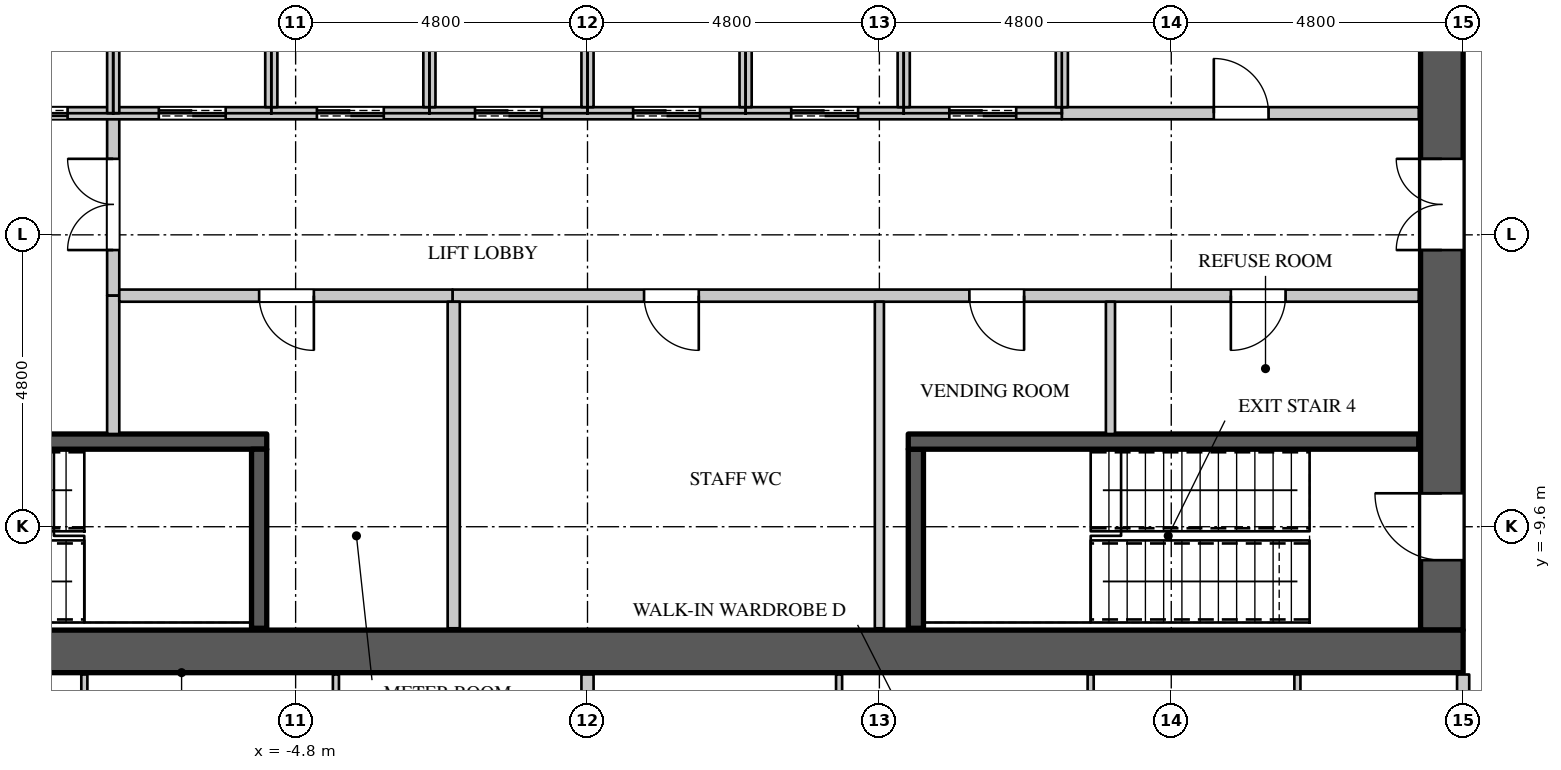
"""IFC4 building model, lengths in metres.
Left out: names, types, materials, properties, quantities, classifications, styles, units other than length and angle.
Written with IfcOpenShell. Run it as: python <this file> out.ifc"""

import sys

from ifc_helpers import new_model, si_unit, direction, frame, frame_2d, origin, place, context, subcontext, project, spatial, rectangle, extrude, element, fill, save


model = new_model("IFC4")
c1 = context("Model", 3, precision=1e-05, world=origin(), true_north=direction((0.0, 1.0)))
c2 = subcontext(c1, "Body", "Model", "MODEL_VIEW")
j1 = project(units=[si_unit("LENGTHUNIT", "METRE"), si_unit("PLANEANGLEUNIT", "RADIAN")], contexts=[c1])
p1 = place(None, origin())
s1 = spatial("IfcSite", under=j1, at=p1, CompositionType="ELEMENT")
p2 = place(p1, origin())
s2 = spatial("IfcBuilding", under=s1, at=p2, CompositionType="ELEMENT")
p3 = place(p2, frame((0.0, 0.0, 166.5)))
s3 = spatial("IfcBuildingStorey", under=s2, at=p3, CompositionType="ELEMENT", Elevation=166.5)
p4 = place(p3, frame((-14.4, -11.65, 0.0), z_axis=(0.0, 0.0, 1.0), x_axis=(1.0, 0.0, 0.0)))
e1 = element("IfcWall", 1, at=p4, inside=s3, PredefinedType="SHEAR", context=c2, shape_type="SweptSolid", body=[
    extrude(rectangle(XDim=28.8, YDim=0.7, at=frame_2d((14.4, 0.0))), origin(), (0.0, 0.0, 1.0), 4.2),
])
p5 = place(p3, frame((14.05, -11.3, 0.0), z_axis=(0.0, 0.0, 1.0), x_axis=(0.0, 1.0, 0.0)))
e2 = element("IfcWall", 2, at=p5, inside=s3, PredefinedType="SHEAR", context=c2, shape_type="SweptSolid", body=[
    extrude(rectangle(XDim=22.6, YDim=0.7, at=frame_2d((11.3, 0.0))), origin(), (0.0, 0.0, 1.0), 4.2),
])
p6 = place(p5, frame((20.35, 0.0, 0.0)))
e3 = element("IfcOpeningElement", 3, at=p6, cuts=e2, PredefinedType="OPENING", context=c2, shape_type="SweptSolid", body=[
    extrude(rectangle(XDim=1.1, YDim=2.2, at=frame_2d((0.55, 1.1))), frame((0.0, 0.36, 0.0), z_axis=(0.0, -1.0, 0.0), x_axis=(1.0, 0.0, 0.0)), (0.0, 0.0, 1.0), 0.72),
])
p7 = place(p5, frame((1.15, 0.0, 0.0)))
e4 = element("IfcOpeningElement", 4, at=p7, cuts=e2, PredefinedType="OPENING", context=c2, shape_type="SweptSolid", body=[
    extrude(rectangle(XDim=1.1, YDim=2.2, at=frame_2d((0.55, 1.1))), frame((0.0, 0.36, 0.0), z_axis=(0.0, -1.0, 0.0), x_axis=(1.0, 0.0, 0.0)), (0.0, 0.0, 1.0), 0.72),
])
p8 = place(p5, frame((14.85, 0.0, 0.0)))
e5 = element("IfcOpeningElement", 5, at=p8, cuts=e2, PredefinedType="OPENING", context=c2, shape_type="SweptSolid", body=[
    extrude(rectangle(XDim=1.5, YDim=2.4, at=frame_2d((0.75, 1.2))), frame((0.0, 0.36, 0.0), z_axis=(0.0, -1.0, 0.0), x_axis=(1.0, 0.0, 0.0)), (0.0, 0.0, 1.0), 0.72),
])
p9 = place(p5, frame((6.25, 0.0, 0.0)))
e6 = element("IfcOpeningElement", 6, at=p9, cuts=e2, PredefinedType="OPENING", context=c2, shape_type="SweptSolid", body=[
    extrude(rectangle(XDim=1.5, YDim=2.4, at=frame_2d((0.75, 1.2))), frame((0.0, 0.36, 0.0), z_axis=(0.0, -1.0, 0.0), x_axis=(1.0, 0.0, 0.0)), (0.0, 0.0, 1.0), 0.72),
])
p10 = place(p3, frame((-7.8, -5.8, 0.0), z_axis=(0.0, 0.0, 1.0), x_axis=(0.0, 1.0, 0.0)))
e7 = element("IfcWall", 7, at=p10, inside=s3, PredefinedType="PARTITIONING", context=c2, shape_type="SweptSolid", body=[
    extrude(rectangle(XDim=3.0, YDim=0.2, at=frame_2d((1.5, 0.0))), origin(), (0.0, 0.0, 1.0), 3.95),
])
p11 = place(p10, frame((0.75, 0.0, 0.0)))
e8 = element("IfcOpeningElement", 8, at=p11, cuts=e7, PredefinedType="OPENING", context=c2, shape_type="SweptSolid", body=[
    extrude(rectangle(XDim=1.5, YDim=2.4, at=frame_2d((0.75, 1.2))), frame((0.0, 0.11, 0.0), z_axis=(0.0, -1.0, 0.0), x_axis=(1.0, 0.0, 0.0)), (0.0, 0.0, 1.0), 0.22),
])
p12 = place(p3, frame((-2.22, -5.8, 0.0), z_axis=(0.0, 0.0, 1.0), x_axis=(1.0, 0.0, 0.0)))
e9 = element("IfcWall", 9, at=p12, inside=s3, PredefinedType="PARTITIONING", context=c2, shape_type="SweptSolid", body=[
    extrude(rectangle(XDim=15.89, YDim=0.2, at=frame_2d((7.945, 0.0))), origin(), (0.0, 0.0, 1.0), 3.95),
])
p13 = place(p12, frame((3.15, 0.0, 0.0)))
e10 = element("IfcOpeningElement", 10, at=p13, cuts=e9, PredefinedType="OPENING", context=c2, shape_type="SweptSolid", body=[
    extrude(rectangle(XDim=0.9, YDim=2.2, at=frame_2d((0.45, 1.1))), frame((0.0, 0.11, 0.0), z_axis=(0.0, -1.0, 0.0), x_axis=(1.0, 0.0, 0.0)), (0.0, 0.0, 1.0), 0.22),
])
p14 = place(p12, frame((8.5, 0.0, 0.0)))
e11 = element("IfcOpeningElement", 11, at=p14, cuts=e9, PredefinedType="OPENING", context=c2, shape_type="SweptSolid", body=[
    extrude(rectangle(XDim=0.9, YDim=2.2, at=frame_2d((0.45, 1.1))), frame((0.0, 0.11, 0.0), z_axis=(0.0, -1.0, 0.0), x_axis=(1.0, 0.0, 0.0)), (0.0, 0.0, 1.0), 0.22),
])
p15 = place(p12, frame((12.8, 0.0, 0.0)))
e12 = element("IfcOpeningElement", 12, at=p15, cuts=e9, PredefinedType="OPENING", context=c2, shape_type="SweptSolid", body=[
    extrude(rectangle(XDim=0.9, YDim=2.2, at=frame_2d((0.45, 1.1))), frame((0.0, 0.11, 0.0), z_axis=(0.0, -1.0, 0.0), x_axis=(1.0, 0.0, 0.0)), (0.0, 0.0, 1.0), 0.22),
])
p16 = place(p3, frame((14.4, -14.3, 0.0), z_axis=(0.0, 0.0, 1.0), x_axis=(0.0, 1.0, 0.0)))
e13 = element("IfcWall", 13, at=p16, inside=s3, PredefinedType="PARTITIONING", context=c2, shape_type="SweptSolid", body=[
    extrude(rectangle(XDim=2.27, YDim=0.2, at=frame_2d((1.135, 0.0))), origin(), (0.0, 0.0, 1.0), 3.95),
])
p17 = place(p3, frame((4.8, -11.27, 0.0), z_axis=(0.0, 0.0, 1.0), x_axis=(0.0, 1.0, 0.0)))
e14 = element("IfcWall", 14, at=p17, inside=s3, PredefinedType="PARTITIONING", context=c2, shape_type="SweptSolid", body=[
    extrude(rectangle(XDim=5.37, YDim=0.15, at=frame_2d((2.685, 0.0))), origin(), (0.0, 0.0, 1.0), 3.95),
])
p18 = place(p3, frame((8.6, -8.075, 0.0), z_axis=(0.0, 0.0, 1.0), x_axis=(0.0, 1.0, 0.0)))
e15 = element("IfcWall", 15, at=p18, inside=s3, PredefinedType="PARTITIONING", context=c2, shape_type="SweptSolid", body=[
    extrude(rectangle(XDim=2.175, YDim=0.15, at=frame_2d((1.087, 0.0))), origin(), (0.0, 0.0, 1.0), 3.95),
])
p19 = place(p3, frame((0.0, -24.055, 0.0), z_axis=(0.0, 0.0, 1.0), x_axis=(0.0, 1.0, 0.0)))
e16 = element("IfcWall", 16, at=p19, inside=s3, PredefinedType="PARTITIONING", context=c2, shape_type="SweptSolid", body=[
    extrude(rectangle(XDim=12.025, YDim=0.2, at=frame_2d((6.012, 0.0))), origin(), (0.0, 0.0, 1.0), 3.95),
])
p20 = place(p3, frame((-7.8, -8.075, 0.0), z_axis=(0.0, 0.0, 1.0), x_axis=(0.0, 1.0, 0.0)))
e17 = element("IfcWall", 17, at=p20, inside=s3, PredefinedType="PARTITIONING", context=c2, shape_type="SweptSolid", body=[
    extrude(rectangle(XDim=2.275, YDim=0.2, at=frame_2d((1.137, 0.0))), origin(), (0.0, 0.0, 1.0), 3.95),
])
p21 = place(p3, frame((-7.7, -5.8, 0.0), z_axis=(0.0, 0.0, 1.0), x_axis=(1.0, 0.0, 0.0)))
e18 = element("IfcWall", 18, at=p21, inside=s3, PredefinedType="PARTITIONING", context=c2, shape_type="SweptSolid", body=[
    extrude(rectangle(XDim=5.48, YDim=0.2, at=frame_2d((2.74, 0.0))), origin(), (0.0, 0.0, 1.0), 3.95),
])
p22 = place(p21, frame((2.3, 0.0, 0.0)))
e19 = element("IfcOpeningElement", 19, at=p22, cuts=e18, PredefinedType="OPENING", context=c2, shape_type="SweptSolid", body=[
    extrude(rectangle(XDim=0.9, YDim=2.2, at=frame_2d((0.45, 1.1))), frame((0.0, 0.11, 0.0), z_axis=(0.0, -1.0, 0.0), x_axis=(1.0, 0.0, 0.0)), (0.0, 0.0, 1.0), 0.22),
])
p23 = place(p3, frame((-2.2, -11.27, 0.0), z_axis=(0.0, 0.0, 1.0), x_axis=(0.0, 1.0, 0.0)))
e20 = element("IfcWall", 20, at=p23, inside=s3, PredefinedType="PARTITIONING", context=c2, shape_type="SweptSolid", body=[
    extrude(rectangle(XDim=5.37, YDim=0.2, at=frame_2d((2.685, 0.0))), origin(), (0.0, 0.0, 1.0), 3.95),
])
p24 = place(p3, frame((7.8, -2.8, 0.0), z_axis=(0.0, 0.0, 1.0), x_axis=(1.0, 0.0, 0.0)))
e21 = element("IfcWall", 21, at=p24, inside=s3, PredefinedType="PARTITIONING", context=c2, shape_type="SweptSolid", body=[
    extrude(rectangle(XDim=5.87, YDim=0.2, at=frame_2d((2.935, 0.0))), origin(), (0.0, 0.0, 1.0), 3.95),
])
p25 = place(p24, frame((2.5, 0.0, 0.0)))
e22 = element("IfcOpeningElement", 22, at=p25, cuts=e21, PredefinedType="OPENING", context=c2, shape_type="SweptSolid", body=[
    extrude(rectangle(XDim=0.9, YDim=2.2, at=frame_2d((0.45, 1.1))), frame((0.0, 0.11, 0.0), z_axis=(0.0, -1.0, 0.0), x_axis=(1.0, 0.0, 0.0)), (0.0, 0.0, 1.0), 0.22),
])
p26 = place(p3, frame((-10.4, -2.8, 0.0), z_axis=(0.0, 0.0, 1.0), x_axis=(1.0, 0.0, 0.0)))
e23 = element("IfcWall", 23, at=p26, inside=s3, PredefinedType="PARTITIONING", context=c2, shape_type="SweptSolid", body=[
    extrude(rectangle(XDim=18.2, YDim=0.2, at=frame_2d((9.1, 0.0))), origin(), (0.0, 0.0, 1.0), 3.95),
])
p27 = place(p26, frame((0.75, 0.0, 0.0)))
e24 = element("IfcOpeningElement", 24, at=p27, cuts=e23, PredefinedType="OPENING", context=c2, shape_type="SweptSolid", body=[
    extrude(rectangle(XDim=1.1, YDim=2.2, at=frame_2d((0.55, 1.1))), frame((0.0, 0.11, 0.0), z_axis=(0.0, -1.0, 0.0), x_axis=(1.0, 0.0, 0.0)), (0.0, 0.0, 1.0), 0.22),
])
p28 = place(p26, frame((3.35, 0.0, 0.0)))
e25 = element("IfcOpeningElement", 25, at=p28, cuts=e23, PredefinedType="OPENING", context=c2, shape_type="SweptSolid", body=[
    extrude(rectangle(XDim=1.1, YDim=2.2, at=frame_2d((0.55, 1.1))), frame((0.0, 0.11, 0.0), z_axis=(0.0, -1.0, 0.0), x_axis=(1.0, 0.0, 0.0)), (0.0, 0.0, 1.0), 0.22),
])
p29 = place(p26, frame((5.95, 0.0, 0.0)))
e26 = element("IfcOpeningElement", 26, at=p29, cuts=e23, PredefinedType="OPENING", context=c2, shape_type="SweptSolid", body=[
    extrude(rectangle(XDim=1.1, YDim=2.2, at=frame_2d((0.55, 1.1))), frame((0.0, 0.11, 0.0), z_axis=(0.0, -1.0, 0.0), x_axis=(1.0, 0.0, 0.0)), (0.0, 0.0, 1.0), 0.22),
])
p30 = place(p26, frame((8.55, 0.0, 0.0)))
e27 = element("IfcOpeningElement", 27, at=p30, cuts=e23, PredefinedType="OPENING", context=c2, shape_type="SweptSolid", body=[
    extrude(rectangle(XDim=1.1, YDim=2.2, at=frame_2d((0.55, 1.1))), frame((0.0, 0.11, 0.0), z_axis=(0.0, -1.0, 0.0), x_axis=(1.0, 0.0, 0.0)), (0.0, 0.0, 1.0), 0.22),
])
p31 = place(p26, frame((11.15, 0.0, 0.0)))
e28 = element("IfcOpeningElement", 28, at=p31, cuts=e23, PredefinedType="OPENING", context=c2, shape_type="SweptSolid", body=[
    extrude(rectangle(XDim=1.1, YDim=2.2, at=frame_2d((0.55, 1.1))), frame((0.0, 0.11, 0.0), z_axis=(0.0, -1.0, 0.0), x_axis=(1.0, 0.0, 0.0)), (0.0, 0.0, 1.0), 0.22),
])
p32 = place(p26, frame((13.75, 0.0, 0.0)))
e29 = element("IfcOpeningElement", 29, at=p32, cuts=e23, PredefinedType="OPENING", context=c2, shape_type="SweptSolid", body=[
    extrude(rectangle(XDim=1.1, YDim=2.2, at=frame_2d((0.55, 1.1))), frame((0.0, 0.11, 0.0), z_axis=(0.0, -1.0, 0.0), x_axis=(1.0, 0.0, 0.0)), (0.0, 0.0, 1.0), 0.22),
])
p33 = place(p26, frame((16.35, 0.0, 0.0)))
e30 = element("IfcOpeningElement", 30, at=p33, cuts=e23, PredefinedType="OPENING", context=c2, shape_type="SweptSolid", body=[
    extrude(rectangle(XDim=1.1, YDim=2.2, at=frame_2d((0.55, 1.1))), frame((0.0, 0.11, 0.0), z_axis=(0.0, -1.0, 0.0), x_axis=(1.0, 0.0, 0.0)), (0.0, 0.0, 1.0), 0.22),
])
p34 = place(p3, frame((-7.8, -2.8, 0.0), z_axis=(0.0, 0.0, 1.0), x_axis=(0.0, 1.0, 0.0)))
e31 = element("IfcWall", 31, at=p34, inside=s3, PredefinedType="PARTITIONING", context=c2, shape_type="SweptSolid", body=[
    extrude(rectangle(XDim=2.8, YDim=0.2, at=frame_2d((1.4, 0.0))), origin(), (0.0, 0.0, 1.0), 3.95),
])
for number, where, z_axis, x_axis in (
    (32, (-5.2, -2.7, 0.0), (0.0, 0.0, 1.0), (0.0, 1.0, 0.0)),
    (33, (-2.6, -2.7, 0.0), (0.0, 0.0, 1.0), (0.0, 1.0, 0.0)),
    (34, (0.0, -2.7, 0.0), (0.0, 0.0, 1.0), (0.0, 1.0, 0.0)),
    (35, (2.6, -2.7, 0.0), (0.0, 0.0, 1.0), (0.0, 1.0, 0.0)),
    (36, (5.2, -2.7, 0.0), (0.0, 0.0, 1.0), (0.0, 1.0, 0.0)),
    (37, (7.8, -2.7, 0.0), (0.0, 0.0, 1.0), (0.0, 1.0, 0.0)),
):
    element("IfcWall", number, at=place(p3, frame(where, z_axis=z_axis, x_axis=x_axis)), inside=s3, PredefinedType="PARTITIONING", context=c2, shape_type="SweptSolid", body=[
        extrude(rectangle(XDim=2.6, YDim=0.2, at=frame_2d((1.3, 0.0))), origin(), (0.0, 0.0, 1.0), 3.95),
    ])
p35 = place(p3, frame((-13.67, -8.2, 0.0), z_axis=(0.0, 0.0, 1.0), x_axis=(1.0, 0.0, 0.0)))
e38 = element("IfcWall", 38, at=p35, inside=s3, PredefinedType="SHEAR", context=c2, shape_type="SweptSolid", body=[
    extrude(rectangle(XDim=8.395, YDim=0.25, at=frame_2d((4.198, 0.0))), origin(), (0.0, 0.0, 1.0), 3.95),
])
p36 = place(p35, frame((0.15, 0.0, 0.0)))
e39 = element("IfcOpeningElement", 39, at=p36, cuts=e38, PredefinedType="OPENING", context=c2, shape_type="SweptSolid", body=[
    extrude(rectangle(XDim=1.1, YDim=2.2, at=frame_2d((0.55, 1.1))), frame((0.0, 0.135, 0.0), z_axis=(0.0, -1.0, 0.0), x_axis=(1.0, 0.0, 0.0)), (0.0, 0.0, 1.0), 0.27),
])
for number, where, z_axis, x_axis in (
    (40, (-5.4, -11.27, 0.0), (0.0, 0.0, 1.0), (0.0, 1.0, 0.0)),
    (41, (5.4, -11.27, 0.0), (0.0, 0.0, 1.0), (0.0, 1.0, 0.0)),
):
    element("IfcWall", number, at=place(p3, frame(where, z_axis=z_axis, x_axis=x_axis)), inside=s3, PredefinedType="SHEAR", context=c2, shape_type="SweptSolid", body=[
        extrude(rectangle(XDim=2.945, YDim=0.25, at=frame_2d((1.473, 0.0))), origin(), (0.0, 0.0, 1.0), 3.95),
    ])
p37 = place(p3, frame((5.275, -8.2, 0.0), z_axis=(0.0, 0.0, 1.0), x_axis=(1.0, 0.0, 0.0)))
e42 = element("IfcWall", 42, at=p37, inside=s3, PredefinedType="SHEAR", context=c2, shape_type="SweptSolid", body=[
    extrude(rectangle(XDim=8.395, YDim=0.25, at=frame_2d((4.198, 0.0))), origin(), (0.0, 0.0, 1.0), 3.95),
])
p38 = place(p3, frame((-8.274, -14.98, 0.0), z_axis=(0.0, 0.0, 1.0), x_axis=(0.0, 1.0, 0.0)))
e43 = element("IfcWall", 43, at=p38, inside=s3, PredefinedType="PARTITIONING", context=c2, shape_type="SweptSolid", body=[
    extrude(rectangle(XDim=2.95, YDim=0.1, at=frame_2d((1.475, 0.0))), origin(), (0.0, 0.0, 1.0), 3.95),
])
for number, where, z_axis, x_axis in (
    (44, (-4.137, -17.325, 0.0), (0.0, 0.0, 1.0), (0.0, 1.0, 0.0)),
    (45, (4.137, -17.325, 0.0), (0.0, 0.0, 1.0), (0.0, 1.0, 0.0)),
):
    element("IfcWall", number, at=place(p3, frame(where, z_axis=z_axis, x_axis=x_axis)), inside=s3, PredefinedType="PARTITIONING", context=c2, shape_type="SweptSolid", body=[
        extrude(rectangle(XDim=5.295, YDim=0.1, at=frame_2d((2.647, 0.0))), origin(), (0.0, 0.0, 1.0), 3.35),
    ])
p39 = place(p3, frame((8.274, -14.98, 0.0), z_axis=(0.0, 0.0, 1.0), x_axis=(0.0, 1.0, 0.0)))
e46 = element("IfcWall", 46, at=p39, inside=s3, PredefinedType="PARTITIONING", context=c2, shape_type="SweptSolid", body=[
    extrude(rectangle(XDim=2.95, YDim=0.1, at=frame_2d((1.475, 0.0))), origin(), (0.0, 0.0, 1.0), 3.95),
])
p40 = place(p3, frame((11.675, -14.925, 0.0), z_axis=(0.0, 0.0, 1.0), x_axis=(0.0, 1.0, 0.0)))
e47 = element("IfcWall", 47, at=p40, inside=s3, PredefinedType="PARTITIONING", context=c2, shape_type="SweptSolid", body=[
    extrude(rectangle(XDim=2.895, YDim=0.1, at=frame_2d((1.448, 0.0))), origin(), (0.0, 0.0, 1.0), 3.95),
])
p41 = place(p40, frame((0.95, 0.0, 0.0)))
e48 = element("IfcOpeningElement", 48, at=p41, cuts=e47, PredefinedType="OPENING", context=c2, shape_type="SweptSolid", body=[
    extrude(rectangle(XDim=0.9, YDim=2.2, at=frame_2d((0.45, 1.1))), frame((0.0, 0.06, 0.0), z_axis=(0.0, -1.0, 0.0), x_axis=(1.0, 0.0, 0.0)), (0.0, 0.0, 1.0), 0.12),
])
p42 = place(p25, origin())
e49 = element("IfcDoor", 49, at=p42, inside=s3, OperationType="SINGLE_SWING_LEFT", PredefinedType="DOOR", context=c2, shape_type="SweptSolid", body=[
    extrude(rectangle(XDim=0.9, YDim=2.2, at=frame_2d((0.45, 1.1))), frame((0.0, 0.025, 0.0), z_axis=(0.0, -1.0, 0.0), x_axis=(1.0, 0.0, 0.0)), (0.0, 0.0, 1.0), 0.05),
])
fill(e22, e49)
p43 = place(p22, origin())
e50 = element("IfcDoor", 50, at=p43, inside=s3, OperationType="SINGLE_SWING_LEFT", PredefinedType="DOOR", context=c2, shape_type="SweptSolid", body=[
    extrude(rectangle(XDim=0.9, YDim=2.2, at=frame_2d((0.45, 1.1))), frame((0.0, 0.025, 0.0), z_axis=(0.0, -1.0, 0.0), x_axis=(1.0, 0.0, 0.0)), (0.0, 0.0, 1.0), 0.05),
])
fill(e19, e50)
p44 = place(p13, origin())
e51 = element("IfcDoor", 51, at=p44, inside=s3, OperationType="SINGLE_SWING_LEFT", PredefinedType="DOOR", context=c2, shape_type="SweptSolid", body=[
    extrude(rectangle(XDim=0.9, YDim=2.2, at=frame_2d((0.45, 1.1))), frame((0.0, 0.025, 0.0), z_axis=(0.0, -1.0, 0.0), x_axis=(1.0, 0.0, 0.0)), (0.0, 0.0, 1.0), 0.05),
])
fill(e10, e51)
p45 = place(p14, origin())
e52 = element("IfcDoor", 52, at=p45, inside=s3, OperationType="SINGLE_SWING_LEFT", PredefinedType="DOOR", context=c2, shape_type="SweptSolid", body=[
    extrude(rectangle(XDim=0.9, YDim=2.2, at=frame_2d((0.45, 1.1))), frame((0.0, 0.025, 0.0), z_axis=(0.0, -1.0, 0.0), x_axis=(1.0, 0.0, 0.0)), (0.0, 0.0, 1.0), 0.05),
])
fill(e11, e52)
p46 = place(p15, origin())
e53 = element("IfcDoor", 53, at=p46, inside=s3, OperationType="SINGLE_SWING_RIGHT", PredefinedType="DOOR", context=c2, shape_type="SweptSolid", body=[
    extrude(rectangle(XDim=0.9, YDim=2.2, at=frame_2d((0.45, 1.1))), frame((0.0, 0.025, 0.0), z_axis=(0.0, -1.0, 0.0), x_axis=(1.0, 0.0, 0.0)), (0.0, 0.0, 1.0), 0.05),
])
fill(e12, e53)
p47 = place(p27, origin())
e54 = element("IfcDoor", 54, at=p47, inside=s3, OperationType="DOUBLE_DOOR_SLIDING", PredefinedType="DOOR", context=c2, shape_type="SweptSolid", body=[
    extrude(rectangle(XDim=1.1, YDim=2.2, at=frame_2d((0.55, 1.1))), frame((0.0, 0.025, 0.0), z_axis=(0.0, -1.0, 0.0), x_axis=(1.0, 0.0, 0.0)), (0.0, 0.0, 1.0), 0.05),
])
fill(e24, e54)
p48 = place(p28, origin())
e55 = element("IfcDoor", 55, at=p48, inside=s3, OperationType="DOUBLE_DOOR_SLIDING", PredefinedType="DOOR", context=c2, shape_type="SweptSolid", body=[
    extrude(rectangle(XDim=1.1, YDim=2.2, at=frame_2d((0.55, 1.1))), frame((0.0, 0.025, 0.0), z_axis=(0.0, -1.0, 0.0), x_axis=(1.0, 0.0, 0.0)), (0.0, 0.0, 1.0), 0.05),
])
fill(e25, e55)
p49 = place(p29, origin())
e56 = element("IfcDoor", 56, at=p49, inside=s3, OperationType="DOUBLE_DOOR_SLIDING", PredefinedType="DOOR", context=c2, shape_type="SweptSolid", body=[
    extrude(rectangle(XDim=1.1, YDim=2.2, at=frame_2d((0.55, 1.1))), frame((0.0, 0.025, 0.0), z_axis=(0.0, -1.0, 0.0), x_axis=(1.0, 0.0, 0.0)), (0.0, 0.0, 1.0), 0.05),
])
fill(e26, e56)
p50 = place(p30, origin())
e57 = element("IfcDoor", 57, at=p50, inside=s3, OperationType="DOUBLE_DOOR_SLIDING", PredefinedType="DOOR", context=c2, shape_type="SweptSolid", body=[
    extrude(rectangle(XDim=1.1, YDim=2.2, at=frame_2d((0.55, 1.1))), frame((0.0, 0.025, 0.0), z_axis=(0.0, -1.0, 0.0), x_axis=(1.0, 0.0, 0.0)), (0.0, 0.0, 1.0), 0.05),
])
fill(e27, e57)
p51 = place(p31, origin())
e58 = element("IfcDoor", 58, at=p51, inside=s3, OperationType="DOUBLE_DOOR_SLIDING", PredefinedType="DOOR", context=c2, shape_type="SweptSolid", body=[
    extrude(rectangle(XDim=1.1, YDim=2.2, at=frame_2d((0.55, 1.1))), frame((0.0, 0.025, 0.0), z_axis=(0.0, -1.0, 0.0), x_axis=(1.0, 0.0, 0.0)), (0.0, 0.0, 1.0), 0.05),
])
fill(e28, e58)
p52 = place(p32, origin())
e59 = element("IfcDoor", 59, at=p52, inside=s3, OperationType="DOUBLE_DOOR_SLIDING", PredefinedType="DOOR", context=c2, shape_type="SweptSolid", body=[
    extrude(rectangle(XDim=1.1, YDim=2.2, at=frame_2d((0.55, 1.1))), frame((0.0, 0.025, 0.0), z_axis=(0.0, -1.0, 0.0), x_axis=(1.0, 0.0, 0.0)), (0.0, 0.0, 1.0), 0.05),
])
fill(e29, e59)
p53 = place(p33, origin())
e60 = element("IfcDoor", 60, at=p53, inside=s3, OperationType="DOUBLE_DOOR_SLIDING", PredefinedType="DOOR", context=c2, shape_type="SweptSolid", body=[
    extrude(rectangle(XDim=1.1, YDim=2.2, at=frame_2d((0.55, 1.1))), frame((0.0, 0.025, 0.0), z_axis=(0.0, -1.0, 0.0), x_axis=(1.0, 0.0, 0.0)), (0.0, 0.0, 1.0), 0.05),
])
fill(e30, e60)
p54 = place(p11, origin())
e61 = element("IfcDoor", 61, at=p54, inside=s3, OperationType="DOUBLE_DOOR_SINGLE_SWING", PredefinedType="DOOR", context=c2, shape_type="SweptSolid", body=[
    extrude(rectangle(XDim=1.5, YDim=2.4, at=frame_2d((0.75, 1.2))), frame((0.0, 0.025, 0.0), z_axis=(0.0, -1.0, 0.0), x_axis=(1.0, 0.0, 0.0)), (0.0, 0.0, 1.0), 0.05),
])
fill(e8, e61)
p55 = place(p7, origin())
e62 = element("IfcDoor", 62, at=p55, inside=s3, OperationType="SINGLE_SWING_RIGHT", PredefinedType="DOOR", context=c2, shape_type="SweptSolid", body=[
    extrude(rectangle(XDim=1.1, YDim=2.2, at=frame_2d((0.55, 1.1))), frame((0.0, 0.345, 0.0), z_axis=(0.0, -1.0, 0.0), x_axis=(1.0, 0.0, 0.0)), (0.0, 0.0, 1.0), 0.05),
])
fill(e4, e62)
p56 = place(p9, origin())
e63 = element("IfcDoor", 63, at=p56, inside=s3, OperationType="DOUBLE_DOOR_SINGLE_SWING", PredefinedType="DOOR", context=c2, shape_type="SweptSolid", body=[
    extrude(rectangle(XDim=1.5, YDim=2.4, at=frame_2d((0.75, 1.2))), frame((0.0, 0.345, 0.0), z_axis=(0.0, -1.0, 0.0), x_axis=(1.0, 0.0, 0.0)), (0.0, 0.0, 1.0), 0.05),
])
fill(e6, e63)
save(model, sys.argv[1])
